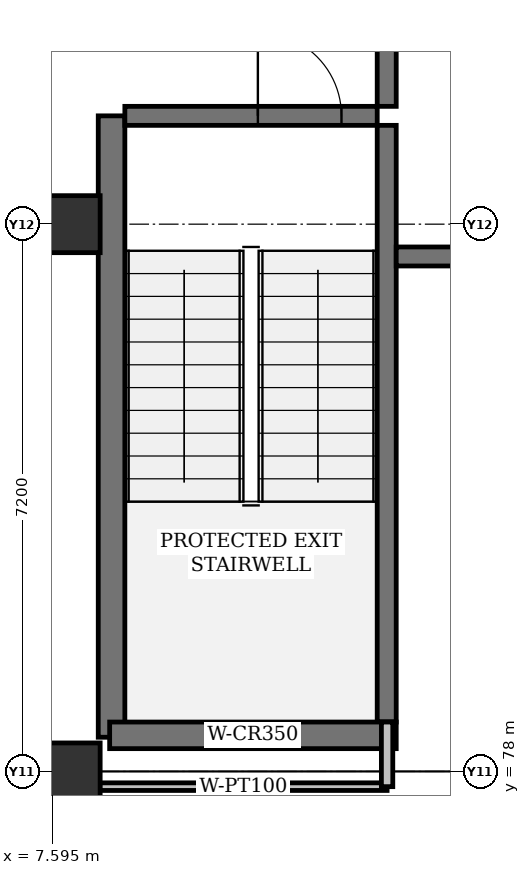
"""IFC4 building model, lengths in metres.
Left out: names, types, materials, properties, quantities, classifications, styles, units other than length and angle.
Written with IfcOpenShell. Run it as: python <this file> out.ifc"""

import sys

from ifc_helpers import new_model, si_unit, direction, frame, frame_2d, origin, origin_2d, place, context, subcontext, project, spatial, rectangle, extrude, element, fill, save


model = new_model("IFC4")
c1 = context("Model", 3, precision=1e-05, world=origin(), true_north=direction((0.0, 1.0)))
c2 = subcontext(c1, "Body", "Model", "MODEL_VIEW")
j1 = project(units=[si_unit("LENGTHUNIT", "METRE"), si_unit("PLANEANGLEUNIT", "RADIAN")], contexts=[c1])
p1 = place(None, origin())
s1 = spatial("IfcSite", under=j1, at=p1, CompositionType="ELEMENT")
p2 = place(p1, origin())
s2 = spatial("IfcBuilding", under=s1, at=p2, CompositionType="ELEMENT")
p3 = place(p2, frame((0.0, 0.0, -8.4)))
s3 = spatial("IfcBuildingStorey", under=s2, at=p3, CompositionType="ELEMENT", Elevation=-8.4)
for number, where, z_axis, x_axis in (
    (1, (7.85, 78.0, -0.3), (0.0, 0.0, 1.0), (1.0, 0.0, 0.0)),
    (2, (7.85, 85.2, -0.3), (0.0, 0.0, 1.0), (1.0, 0.0, 0.0)),
):
    element("IfcColumn", number, at=place(p3, frame(where, z_axis=z_axis, x_axis=x_axis)), inside=s3, PredefinedType="COLUMN", context=c2, shape_type="SweptSolid", body=[
        extrude(rectangle(XDim=0.75, YDim=0.75, at=origin_2d()), origin(), (0.0, 0.0, 1.0), 4.5),
    ])
p4 = place(p3, frame((8.375, 78.45, -0.3), z_axis=(0.0, 0.0, 1.0), x_axis=(0.0, 1.0, 0.0)))
e3 = element("IfcWall", 3, at=p4, inside=s3, PredefinedType="SHEAR", context=c2, shape_type="SweptSolid", body=[
    extrude(rectangle(XDim=8.175, YDim=0.35, at=frame_2d((4.087, 0.0))), origin(), (0.0, 0.0, 1.0), 4.5),
])
p5 = place(p3, frame((11.995, 78.65, -0.3), z_axis=(0.0, 0.0, 1.0), x_axis=(0.0, 1.0, 0.0)))
e4 = element("IfcWall", 4, at=p5, inside=s3, PredefinedType="SHEAR", context=c2, shape_type="SweptSolid", body=[
    extrude(rectangle(XDim=7.85, YDim=0.25, at=frame_2d((3.925, 0.0))), origin(), (0.0, 0.0, 1.0), 4.5),
])
p6 = place(p3, frame((11.995, 86.75, -0.3), z_axis=(0.0, 0.0, 1.0), x_axis=(0.0, 1.0, 0.0)))
e5 = element("IfcWall", 5, at=p6, inside=s3, PredefinedType="SHEAR", context=c2, shape_type="SweptSolid", body=[
    extrude(rectangle(XDim=3.9, YDim=0.25, at=frame_2d((1.95, 0.0))), origin(), (0.0, 0.0, 1.0), 4.5),
])
p7 = place(p6, frame((1.3, 0.0, 0.3)))
e6 = element("IfcOpeningElement", 6, at=p7, cuts=e5, PredefinedType="OPENING", context=c2, shape_type="SweptSolid", body=[
    extrude(rectangle(XDim=1.25, YDim=2.2, at=frame_2d((0.625, 1.1))), frame((0.0, 0.125, 0.0), z_axis=(0.0, -1.0, 0.0), x_axis=(1.0, 0.0, 0.0)), (0.0, 0.0, 1.0), 0.25),
])
p8 = place(p3, frame((8.35, 78.475, -0.3), z_axis=(0.0, 0.0, 1.0), x_axis=(1.0, 0.0, 0.0)))
e7 = element("IfcWall", 7, at=p8, inside=s3, PredefinedType="SHEAR", context=c2, shape_type="SweptSolid", body=[
    extrude(rectangle(XDim=3.77, YDim=0.35, at=frame_2d((1.885, 0.0))), origin(), (0.0, 0.0, 1.0), 4.5),
])
p9 = place(p3, frame((8.55, 86.625, -0.3), z_axis=(0.0, 0.0, 1.0), x_axis=(1.0, 0.0, 0.0)))
e8 = element("IfcWall", 8, at=p9, inside=s3, PredefinedType="SHEAR", context=c2, shape_type="SweptSolid", body=[
    extrude(rectangle(XDim=3.32, YDim=0.25, at=frame_2d((1.66, 0.0))), origin(), (0.0, 0.0, 1.0), 4.5),
])
p10 = place(p9, frame((1.75, 0.0, 0.3)))
e9 = element("IfcOpeningElement", 9, at=p10, cuts=e8, PredefinedType="OPENING", context=c2, shape_type="SweptSolid", body=[
    extrude(rectangle(XDim=1.1, YDim=2.15, at=frame_2d((0.55, 1.075))), frame((0.0, 0.125, 0.0), z_axis=(0.0, -1.0, 0.0), x_axis=(1.0, 0.0, 0.0)), (0.0, 0.0, 1.0), 0.25),
])
p11 = place(p3, frame((12.12, 84.775, -0.3), z_axis=(0.0, 0.0, 1.0), x_axis=(1.0, 0.0, 0.0)))
e10 = element("IfcWall", 10, at=p11, inside=s3, PredefinedType="SHEAR", context=c2, shape_type="SweptSolid", body=[
    extrude(rectangle(XDim=4.03, YDim=0.25, at=frame_2d((2.015, 0.0))), origin(), (0.0, 0.0, 1.0), 4.5),
])
p12 = place(p11, frame((1.3, 0.0, 0.3)))
e11 = element("IfcOpeningElement", 11, at=p12, cuts=e10, PredefinedType="OPENING", context=c2, shape_type="SweptSolid", body=[
    extrude(rectangle(XDim=1.4, YDim=2.25, at=frame_2d((0.7, 1.125))), frame((0.0, 0.125, 0.0), z_axis=(0.0, -1.0, 0.0), x_axis=(1.0, 0.0, 0.0)), (0.0, 0.0, 1.0), 0.25),
])
p13 = place(p3, frame((8.22, 77.8, 0.0), z_axis=(0.0, 0.0, 1.0), x_axis=(1.0, 0.0, 0.0)))
e12 = element("IfcWall", 12, at=p13, inside=s3, PredefinedType="PARTITIONING", context=c2, shape_type="SweptSolid", body=[
    extrude(rectangle(XDim=3.78, YDim=0.1, at=frame_2d((1.89, 0.0))), origin(), (0.0, 0.0, 1.0), 3.411),
])
p14 = place(p3, frame((12.0, 77.8, 0.0), z_axis=(0.0, 0.0, 1.0), x_axis=(0.0, 1.0, 0.0)))
e13 = element("IfcWall", 13, at=p14, inside=s3, PredefinedType="PARTITIONING", context=c2, shape_type="SweptSolid", body=[
    extrude(rectangle(XDim=0.85, YDim=0.15, at=frame_2d((0.425, 0.0))), origin(), (0.0, 0.0, 1.0), 3.411),
])
p15 = place(p10, origin())
e14 = element("IfcDoor", 14, at=p15, inside=s3, OperationType="SINGLE_SWING_LEFT", PredefinedType="DOOR", context=c2, shape_type="SweptSolid", body=[
    extrude(rectangle(XDim=1.1, YDim=2.15, at=frame_2d((0.55, 1.075))), frame((0.0, 0.025, 0.0), z_axis=(0.0, -1.0, 0.0), x_axis=(1.0, 0.0, 0.0)), (0.0, 0.0, 1.0), 0.05),
])
fill(e9, e14)
save(model, sys.argv[1])
